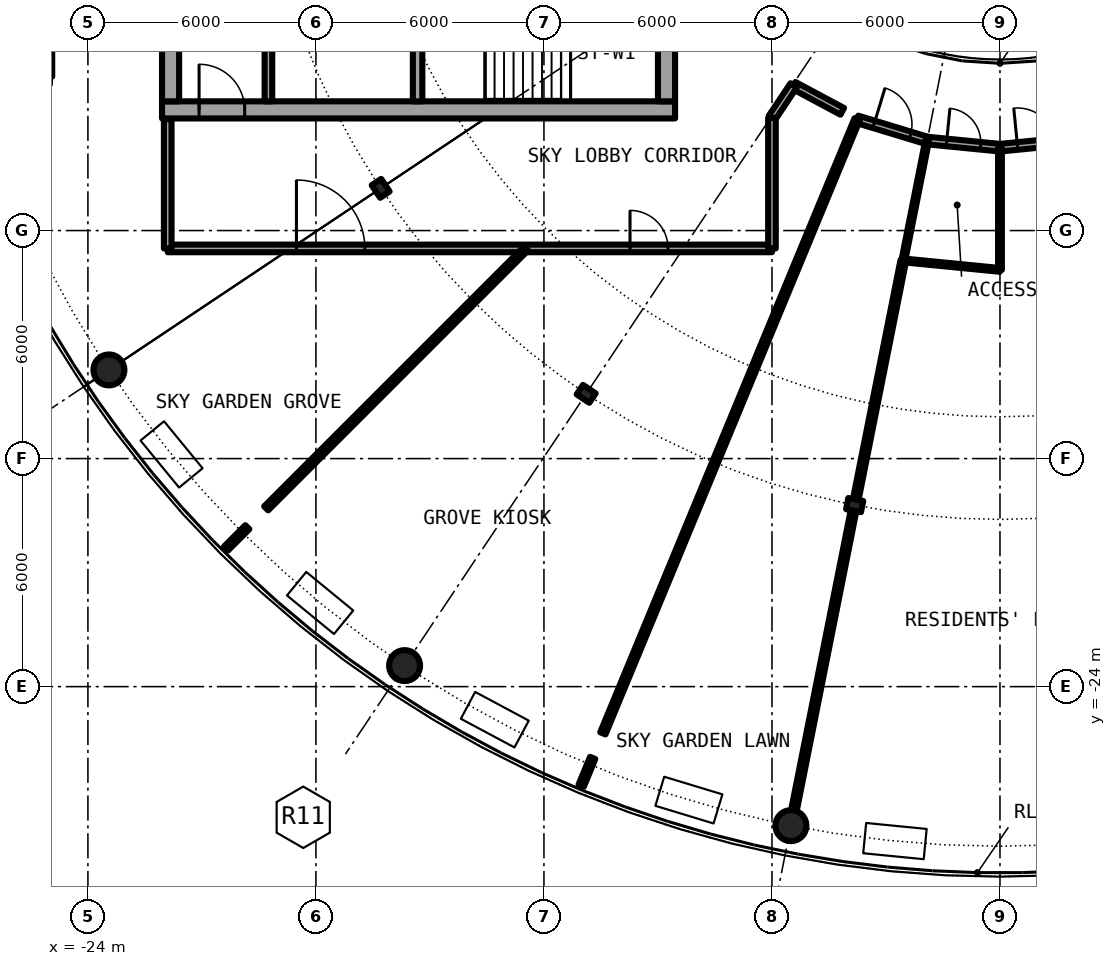
"""IFC4 building model, lengths in metres.
Left out: names, types, materials, properties, quantities, classifications, styles, units other than length and angle.
Written with IfcOpenShell. Run it as: python <this file> out.ifc"""

import sys

from ifc_helpers import new_model, si_unit, direction, frame, frame_2d, origin, origin_2d, place, context, subcontext, project, spatial, rectangle, hollow_circle, i_section, extrude, element, fill, save


model = new_model("IFC4")
c1 = context("Model", 3, precision=1e-05, world=origin(), true_north=direction((0.0, 1.0)))
c2 = subcontext(c1, "Body", "Model", "MODEL_VIEW")
j1 = project(units=[si_unit("LENGTHUNIT", "METRE"), si_unit("PLANEANGLEUNIT", "RADIAN")], contexts=[c1])
p1 = place(None, origin())
s1 = spatial("IfcSite", under=j1, at=p1, CompositionType="ELEMENT")
p2 = place(p1, origin())
s2 = spatial("IfcBuilding", under=s1, at=p2, CompositionType="ELEMENT")
p3 = place(p2, frame((0.0, 0.0, 221.85)))
s3 = spatial("IfcBuildingStorey", under=s2, at=p3, CompositionType="ELEMENT", Elevation=221.85)
for number, where, z_axis, x_axis in (
    (1, (-23.448, -15.667, 0.0), (0.0, 0.0, 1.0), (1.0, 0.0, 0.0)),
    (2, (-15.667, -23.448, 0.0), (0.0, 0.0, 1.0), (1.0, 0.0, 0.0)),
    (3, (-5.501, -27.658, 0.0), (0.0, 0.0, 1.0), (1.0, 0.0, 0.0)),
):
    element("IfcColumn", number, at=place(p3, frame(where, z_axis=z_axis, x_axis=x_axis)), inside=s3, PredefinedType="COLUMN", context=c2, shape_type="SweptSolid", body=[
        extrude(hollow_circle(Radius=0.406, WallThickness=0.03, at=origin_2d()), origin(), (0.0, 0.0, 1.0), 6.1),
    ])
for number, where, z_axis, x_axis in (
    (4, (-16.297, -10.889, 0.0), (0.0, 0.0, 1.0), (-0.831, -0.556, 0.0)),
    (5, (-10.889, -16.297, 0.0), (0.0, 0.0, 1.0), (-0.556, -0.831, 0.0)),
    (6, (-3.824, -19.223, 0.0), (0.0, 0.0, 1.0), (-0.195, -0.981, 0.0)),
):
    element("IfcColumn", number, at=place(p3, frame(where, z_axis=z_axis, x_axis=x_axis)), inside=s3, PredefinedType="COLUMN", context=c2, shape_type="SweptSolid", body=[
        extrude(i_section(OverallWidth=0.3, OverallDepth=0.4, WebThickness=0.013, FlangeThickness=0.024, FilletRadius=0.027, at=origin_2d()), origin(), (0.0, 0.0, 1.0), 6.1),
    ])
p4 = place(p3, frame((-22.05, -8.825, 0.0), z_axis=(0.0, 0.0, 1.0), x_axis=(1.0, 0.0, 0.0)))
e7 = element("IfcWall", 7, at=p4, inside=s3, PredefinedType="SHEAR", context=c2, shape_type="SweptSolid", body=[
    extrude(rectangle(XDim=13.5, YDim=0.45, at=frame_2d((6.75, 0.0))), origin(), (0.0, 0.0, 1.0), 6.1),
])
p5 = place(p4, frame((0.975, 0.0, 0.0)))
e8 = element("IfcOpeningElement", 8, at=p5, cuts=e7, PredefinedType="OPENING", context=c2, shape_type="SweptSolid", body=[
    extrude(rectangle(XDim=1.2, YDim=2.3, at=frame_2d((0.6, 1.15))), frame((0.0, 0.235, 0.0), z_axis=(0.0, -1.0, 0.0), x_axis=(1.0, 0.0, 0.0)), (0.0, 0.0, 1.0), 0.47),
])
p6 = place(p3, frame((-21.825, -8.6, 0.0), z_axis=(0.0, 0.0, 1.0), x_axis=(0.0, 1.0, 0.0)))
e9 = element("IfcWall", 9, at=p6, inside=s3, PredefinedType="SHEAR", context=c2, shape_type="SweptSolid", body=[
    extrude(rectangle(XDim=17.2, YDim=0.45, at=frame_2d((8.6, 0.0))), origin(), (0.0, 0.0, 1.0), 6.1),
])
p7 = place(p6, frame((7.4, 0.0, 0.0)))
e10 = element("IfcOpeningElement", 10, at=p7, cuts=e9, PredefinedType="OPENING", context=c2, shape_type="SweptSolid", body=[
    extrude(rectangle(XDim=2.4, YDim=2.3, at=frame_2d((1.2, 1.15))), frame((0.0, 0.235, 0.0), z_axis=(0.0, -1.0, 0.0), x_axis=(1.0, 0.0, 0.0)), (0.0, 0.0, 1.0), 0.47),
])
p8 = place(p3, frame((-8.775, 8.6, 0.0), z_axis=(0.0, 0.0, 1.0), x_axis=(0.0, -1.0, 0.0)))
e11 = element("IfcWall", 11, at=p8, inside=s3, PredefinedType="SHEAR", context=c2, shape_type="SweptSolid", body=[
    extrude(rectangle(XDim=17.2, YDim=0.45, at=frame_2d((8.6, 0.0))), origin(), (0.0, 0.0, 1.0), 6.1),
])
p9 = place(p8, frame((7.4, 0.0, 0.1)))
e12 = element("IfcOpeningElement", 12, at=p9, cuts=e11, PredefinedType="OPENING", context=c2, shape_type="SweptSolid", body=[
    extrude(rectangle(XDim=2.4, YDim=2.2, at=frame_2d((1.2, 1.1))), frame((0.0, 0.235, 0.0), z_axis=(0.0, -1.0, 0.0), x_axis=(1.0, 0.0, 0.0)), (0.0, 0.0, 1.0), 0.47),
])
p10 = place(p3, frame((-15.325, -4.65, 0.0), z_axis=(0.0, 0.0, 1.0), x_axis=(0.0, -1.0, 0.0)))
e13 = element("IfcWall", 13, at=p10, inside=s3, PredefinedType="SHEAR", context=c2, shape_type="SweptSolid", body=[
    extrude(rectangle(XDim=3.95, YDim=0.25, at=frame_2d((1.975, 0.0))), origin(), (0.0, 0.0, 1.0), 6.1),
])
p11 = place(p10, frame((1.375, 0.0, 0.0)))
e14 = element("IfcOpeningElement", 14, at=p11, cuts=e13, PredefinedType="OPENING", context=c2, shape_type="SweptSolid", body=[
    extrude(rectangle(XDim=1.2, YDim=2.3, at=frame_2d((0.6, 1.15))), frame((0.0, 0.135, 0.0), z_axis=(0.0, -1.0, 0.0), x_axis=(1.0, 0.0, 0.0)), (0.0, 0.0, 1.0), 0.27),
])
p12 = place(p3, frame((-19.25, -1.575, 0.0), z_axis=(0.0, 0.0, 1.0), x_axis=(0.0, -1.0, 0.0)))
e15 = element("IfcWall", 15, at=p12, inside=s3, PredefinedType="SOLIDWALL", context=c2, shape_type="SweptSolid", body=[
    extrude(rectangle(XDim=7.025, YDim=0.2, at=frame_2d((3.513, 0.0))), origin(), (0.0, 0.0, 1.0), 5.75),
])
p13 = place(p12, frame((4.475, 0.0, 0.0)))
e16 = element("IfcOpeningElement", 16, at=p13, cuts=e15, PredefinedType="OPENING", context=c2, shape_type="SweptSolid", body=[
    extrude(rectangle(XDim=1.1, YDim=2.3, at=frame_2d((0.55, 1.15))), frame((0.0, 0.11, 0.0), z_axis=(0.0, -1.0, 0.0), x_axis=(1.0, 0.0, 0.0)), (0.0, 0.0, 1.0), 0.22),
])
p14 = place(p3, frame((-25.0, -3.5, 0.0), z_axis=(0.0, 0.0, 1.0), x_axis=(0.0, -1.0, 0.0)))
e17 = element("IfcWall", 17, at=p14, inside=s3, PredefinedType="PARTITIONING", context=c2, shape_type="SweptSolid", body=[
    extrude(rectangle(XDim=4.45, YDim=0.12, at=frame_2d((2.225, 0.0))), origin(), (0.0, 0.0, 1.0), 5.75),
])
p15 = place(p14, frame((0.4, 0.0, 0.1)))
e18 = element("IfcOpeningElement", 18, at=p15, cuts=e17, PredefinedType="OPENING", context=c2, shape_type="SweptSolid", body=[
    extrude(rectangle(XDim=3.6, YDim=5.4, at=frame_2d((1.8, 2.7))), frame((0.0, 0.07, 0.0), z_axis=(0.0, -1.0, 0.0), x_axis=(1.0, 0.0, 0.0)), (0.0, 0.0, 1.0), 0.14),
])
p16 = place(p3, frame((-2.543, -12.785, 0.0), z_axis=(0.0, 0.0, 1.0), x_axis=(0.995202292453, -0.09783862783, 0.0)))
e19 = element("IfcWall", 19, at=p16, inside=s3, PredefinedType="PARTITIONING", context=c2, shape_type="SweptSolid", body=[
    extrude(rectangle(XDim=2.555, YDim=0.1, at=frame_2d((1.278, 0.0))), origin(), (0.0, 0.0, 1.0), 5.75),
])
p17 = place(p3, frame((-21.9, -12.47, 0.0), z_axis=(0.0, 0.0, 1.0), x_axis=(1.0, 0.0, 0.0)))
e20 = element("IfcWall", 20, at=p17, inside=s3, PredefinedType="PARTITIONING", context=c2, shape_type="SweptSolid", body=[
    extrude(rectangle(XDim=15.9, YDim=0.2, at=frame_2d((7.95, 0.0))), origin(), (0.0, 0.0, 1.0), 5.75),
])
p18 = place(p17, frame((12.165, 0.0, 0.0)))
e21 = element("IfcOpeningElement", 21, at=p18, cuts=e20, PredefinedType="OPENING", context=c2, shape_type="SweptSolid", body=[
    extrude(rectangle(XDim=1.0, YDim=2.3, at=frame_2d((0.5, 1.15))), frame((0.0, 0.11, 0.0), z_axis=(0.0, -1.0, 0.0), x_axis=(1.0, 0.0, 0.0)), (0.0, 0.0, 1.0), 0.22),
])
p19 = place(p17, frame((3.387, 0.0, 0.0)))
e22 = element("IfcOpeningElement", 22, at=p19, cuts=e20, PredefinedType="OPENING", context=c2, shape_type="SweptSolid", body=[
    extrude(rectangle(XDim=1.8, YDim=2.3, at=frame_2d((0.9, 1.15))), frame((0.0, 0.11, 0.0), z_axis=(0.0, -1.0, 0.0), x_axis=(1.0, 0.0, 0.0)), (0.0, 0.0, 1.0), 0.22),
])
p20 = place(p3, frame((-5.429, -8.179, 0.0), z_axis=(0.0, 0.0, 1.0), x_axis=(0.881652665802, -0.471898905364, 0.0)))
e23 = element("IfcWall", 23, at=p20, inside=s3, PredefinedType="PARTITIONING", context=c2, shape_type="SweptSolid", body=[
    extrude(rectangle(XDim=1.45, YDim=0.2, at=frame_2d((0.725, 0.0))), origin(), (0.0, 0.0, 1.0), 5.75),
])
p21 = place(p3, frame((-3.758, -9.072, 0.0), z_axis=(0.0, 0.0, 1.0), x_axis=(0.956896312675, -0.29042976223, 0.0)))
e24 = element("IfcWall", 24, at=p21, inside=s3, PredefinedType="PARTITIONING", context=c2, shape_type="SweptSolid", body=[
    extrude(rectangle(XDim=1.925, YDim=0.2, at=frame_2d((0.962, 0.0))), origin(), (0.0, 0.0, 1.0), 5.75),
])
p22 = place(p21, frame((0.462, 0.0, 0.0)))
e25 = element("IfcOpeningElement", 25, at=p22, cuts=e24, PredefinedType="OPENING", context=c2, shape_type="SweptSolid", body=[
    extrude(rectangle(XDim=1.0, YDim=2.3, at=frame_2d((0.5, 1.15))), frame((0.0, 0.11, 0.0), z_axis=(0.0, -1.0, 0.0), x_axis=(1.0, 0.0, 0.0)), (0.0, 0.0, 1.0), 0.22),
])
p23 = place(p3, frame((-1.916, -9.631, 0.0), z_axis=(0.0, 0.0, 1.0), x_axis=(0.995171860647, -0.098147683504, 0.0)))
e26 = element("IfcWall", 26, at=p23, inside=s3, PredefinedType="PARTITIONING", context=c2, shape_type="SweptSolid", body=[
    extrude(rectangle(XDim=1.925, YDim=0.2, at=frame_2d((0.963, 0.0))), origin(), (0.0, 0.0, 1.0), 5.75),
])
p24 = place(p23, frame((0.513, 0.0, 0.0)))
e27 = element("IfcOpeningElement", 27, at=p24, cuts=e26, PredefinedType="OPENING", context=c2, shape_type="SweptSolid", body=[
    extrude(rectangle(XDim=0.9, YDim=2.3, at=frame_2d((0.45, 1.15))), frame((0.0, 0.11, 0.0), z_axis=(0.0, -1.0, 0.0), x_axis=(1.0, 0.0, 0.0)), (0.0, 0.0, 1.0), 0.22),
])
p25 = place(p3, frame((0.0, -9.82, 0.0), z_axis=(0.0, 0.0, 1.0), x_axis=(0.995171860647, 0.098147683504, 0.0)))
e28 = element("IfcWall", 28, at=p25, inside=s3, PredefinedType="PARTITIONING", context=c2, shape_type="SweptSolid", body=[
    extrude(rectangle(XDim=1.925, YDim=0.2, at=frame_2d((0.963, 0.0))), origin(), (0.0, 0.0, 1.0), 5.75),
])
p26 = place(p25, frame((0.463, 0.0, 0.0)))
e29 = element("IfcOpeningElement", 29, at=p26, cuts=e28, PredefinedType="OPENING", context=c2, shape_type="SweptSolid", body=[
    extrude(rectangle(XDim=1.0, YDim=2.3, at=frame_2d((0.5, 1.15))), frame((0.0, 0.11, 0.0), z_axis=(0.0, -1.0, 0.0), x_axis=(1.0, 0.0, 0.0)), (0.0, 0.0, 1.0), 0.22),
])
p27 = place(p3, frame((-6.0, -9.034, 0.0), z_axis=(0.0, 0.0, 1.0), x_axis=(0.555412364489, 0.831575075007, 0.0)))
e30 = element("IfcWall", 30, at=p27, inside=s3, PredefinedType="PARTITIONING", context=c2, shape_type="SweptSolid", body=[
    extrude(rectangle(XDim=1.028, YDim=0.2, at=frame_2d((0.514, 0.0))), origin(), (0.0, 0.0, 1.0), 5.75),
])
p28 = place(p3, frame((-20.365, -20.365, 0.0), z_axis=(0.0, 0.0, 1.0), x_axis=(0.707106781187, 0.707106781187, 0.0)))
e31 = element("IfcWall", 31, at=p28, inside=s3, PredefinedType="PARTITIONING", context=c2, shape_type="SweptSolid", body=[
    extrude(rectangle(XDim=0.792, YDim=0.15, at=frame_2d((0.396, 0.0))), origin(), (0.0, 0.0, 1.0), 5.75),
])
p29 = place(p3, frame((-19.31, -19.31, 0.0), z_axis=(0.0, 0.0, 1.0), x_axis=(0.707106781187, 0.707106781187, 0.0)))
e32 = element("IfcWall", 32, at=p29, inside=s3, PredefinedType="PARTITIONING", context=c2, shape_type="SweptSolid", body=[
    extrude(rectangle(XDim=9.673, YDim=0.15, at=frame_2d((4.837, 0.0))), origin(), (0.0, 0.0, 1.0), 5.75),
])
p30 = place(p3, frame((-11.021, -26.608, 0.0), z_axis=(0.0, 0.0, 1.0), x_axis=(0.382469748433, 0.923968014345, 0.0)))
e33 = element("IfcWall", 33, at=p30, inside=s3, PredefinedType="PARTITIONING", context=c2, shape_type="SweptSolid", body=[
    extrude(rectangle(XDim=0.792, YDim=0.15, at=frame_2d((0.396, 0.0))), origin(), (0.0, 0.0, 1.0), 5.75),
])
p31 = place(p3, frame((-10.45, -25.23, 0.0), z_axis=(0.0, 0.0, 1.0), x_axis=(0.382637007118, 0.923898761112, 0.0)))
e34 = element("IfcWall", 34, at=p31, inside=s3, PredefinedType="PARTITIONING", context=c2, shape_type="SweptSolid", body=[
    extrude(rectangle(XDim=17.489, YDim=0.15, at=frame_2d((8.744, 0.0))), origin(), (0.0, 0.0, 1.0), 5.75),
])
p32 = place(p3, frame((-5.424, -27.267, 0.0), z_axis=(0.0, 0.0, 1.0), x_axis=(0.195106720959, 0.980782018308, 0.0)))
e35 = element("IfcWall", 35, at=p32, inside=s3, PredefinedType="PARTITIONING", context=c2, shape_type="SweptSolid", body=[
    extrude(rectangle(XDim=8.001, YDim=0.15, at=frame_2d((4.0, 0.0))), origin(), (0.0, 0.0, 1.0), 5.75),
])
p33 = place(p3, frame((-3.785, -19.027, 0.0), z_axis=(0.0, 0.0, 1.0), x_axis=(0.195134918279, 0.980776408601, 0.0)))
e36 = element("IfcWall", 36, at=p33, inside=s3, PredefinedType="PARTITIONING", context=c2, shape_type="SweptSolid", body=[
    extrude(rectangle(XDim=6.365, YDim=0.15, at=frame_2d((3.182, 0.0))), origin(), (0.0, 0.0, 1.0), 5.75),
])
p34 = place(p3, frame((-2.543, -12.785, 0.0), z_axis=(0.0, 0.0, 1.0), x_axis=(0.194977117829, 0.980807791325, 0.0)))
e37 = element("IfcWall", 37, at=p34, inside=s3, PredefinedType="PARTITIONING", context=c2, shape_type="SweptSolid", body=[
    extrude(rectangle(XDim=3.216, YDim=0.1, at=frame_2d((1.608, 0.0))), origin(), (0.0, 0.0, 1.0), 5.75),
])
p35 = place(p3, frame((0.0, -13.035, 0.0), z_axis=(0.0, 0.0, 1.0), x_axis=(0.0, 1.0, 0.0)))
e38 = element("IfcWall", 38, at=p35, inside=s3, PredefinedType="PARTITIONING", context=c2, shape_type="SweptSolid", body=[
    extrude(rectangle(XDim=3.215, YDim=0.1, at=frame_2d((1.607, 0.0))), origin(), (0.0, 0.0, 1.0), 5.75),
])
p36 = place(p3, frame((-6.0, -12.47, 0.0), z_axis=(0.0, 0.0, 1.0), x_axis=(0.0, 1.0, 0.0)))
e39 = element("IfcWall", 39, at=p36, inside=s3, PredefinedType="PARTITIONING", context=c2, shape_type="SweptSolid", body=[
    extrude(rectangle(XDim=3.436, YDim=0.2, at=frame_2d((1.718, 0.0))), origin(), (0.0, 0.0, 1.0), 5.75),
])
p37 = place(p3, frame((-21.9, -12.47, 0.0), z_axis=(0.0, 0.0, 1.0), x_axis=(0.0, 1.0, 0.0)))
e40 = element("IfcWall", 40, at=p37, inside=s3, PredefinedType="PARTITIONING", context=c2, shape_type="SweptSolid", body=[
    extrude(rectangle(XDim=3.4, YDim=0.2, at=frame_2d((1.7, 0.0))), origin(), (0.0, 0.0, 1.0), 5.75),
])
p38 = place(p5, origin())
e41 = element("IfcDoor", 41, at=p38, inside=s3, OperationType="SINGLE_SWING_RIGHT", PredefinedType="DOOR", context=c2, shape_type="SweptSolid", body=[
    extrude(rectangle(XDim=1.2, YDim=2.3, at=frame_2d((0.6, 1.15))), frame((0.0, 0.025, 0.0), z_axis=(0.0, -1.0, 0.0), x_axis=(1.0, 0.0, 0.0)), (0.0, 0.0, 1.0), 0.05),
])
fill(e8, e41)
p39 = place(p18, origin())
e42 = element("IfcDoor", 42, at=p39, inside=s3, OperationType="SINGLE_SWING_RIGHT", PredefinedType="DOOR", context=c2, shape_type="SweptSolid", body=[
    extrude(rectangle(XDim=1.0, YDim=2.3, at=frame_2d((0.5, 1.15))), frame((0.0, 0.025, 0.0), z_axis=(0.0, -1.0, 0.0), x_axis=(1.0, 0.0, 0.0)), (0.0, 0.0, 1.0), 0.05),
])
fill(e21, e42)
p40 = place(p24, origin())
e43 = element("IfcDoor", 43, at=p40, inside=s3, OperationType="SINGLE_SWING_RIGHT", PredefinedType="DOOR", context=c2, shape_type="SweptSolid", body=[
    extrude(rectangle(XDim=0.9, YDim=2.3, at=frame_2d((0.45, 1.15))), frame((0.0, 0.025, 0.0), z_axis=(0.0, -1.0, 0.0), x_axis=(1.0, 0.0, 0.0)), (0.0, 0.0, 1.0), 0.05),
])
fill(e27, e43)
p41 = place(p26, origin())
e44 = element("IfcDoor", 44, at=p41, inside=s3, OperationType="SINGLE_SWING_LEFT", PredefinedType="DOOR", context=c2, shape_type="SweptSolid", body=[
    extrude(rectangle(XDim=1.0, YDim=2.3, at=frame_2d((0.5, 1.15))), frame((0.0, 0.025, 0.0), z_axis=(0.0, -1.0, 0.0), x_axis=(1.0, 0.0, 0.0)), (0.0, 0.0, 1.0), 0.05),
])
fill(e29, e44)
p42 = place(p19, origin())
e45 = element("IfcDoor", 45, at=p42, inside=s3, OperationType="DOUBLE_DOOR_SINGLE_SWING", PredefinedType="DOOR", context=c2, shape_type="SweptSolid", body=[
    extrude(rectangle(XDim=1.8, YDim=2.3, at=frame_2d((0.9, 1.15))), frame((0.0, 0.025, 0.0), z_axis=(0.0, -1.0, 0.0), x_axis=(1.0, 0.0, 0.0)), (0.0, 0.0, 1.0), 0.05),
])
fill(e22, e45)
p43 = place(p22, origin())
e46 = element("IfcDoor", 46, at=p43, inside=s3, OperationType="SINGLE_SWING_LEFT", PredefinedType="DOOR", context=c2, shape_type="SweptSolid", body=[
    extrude(rectangle(XDim=1.0, YDim=2.3, at=frame_2d((0.5, 1.15))), frame((0.0, 0.025, 0.0), z_axis=(0.0, -1.0, 0.0), x_axis=(1.0, 0.0, 0.0)), (0.0, 0.0, 1.0), 0.05),
])
fill(e25, e46)
save(model, sys.argv[1])
